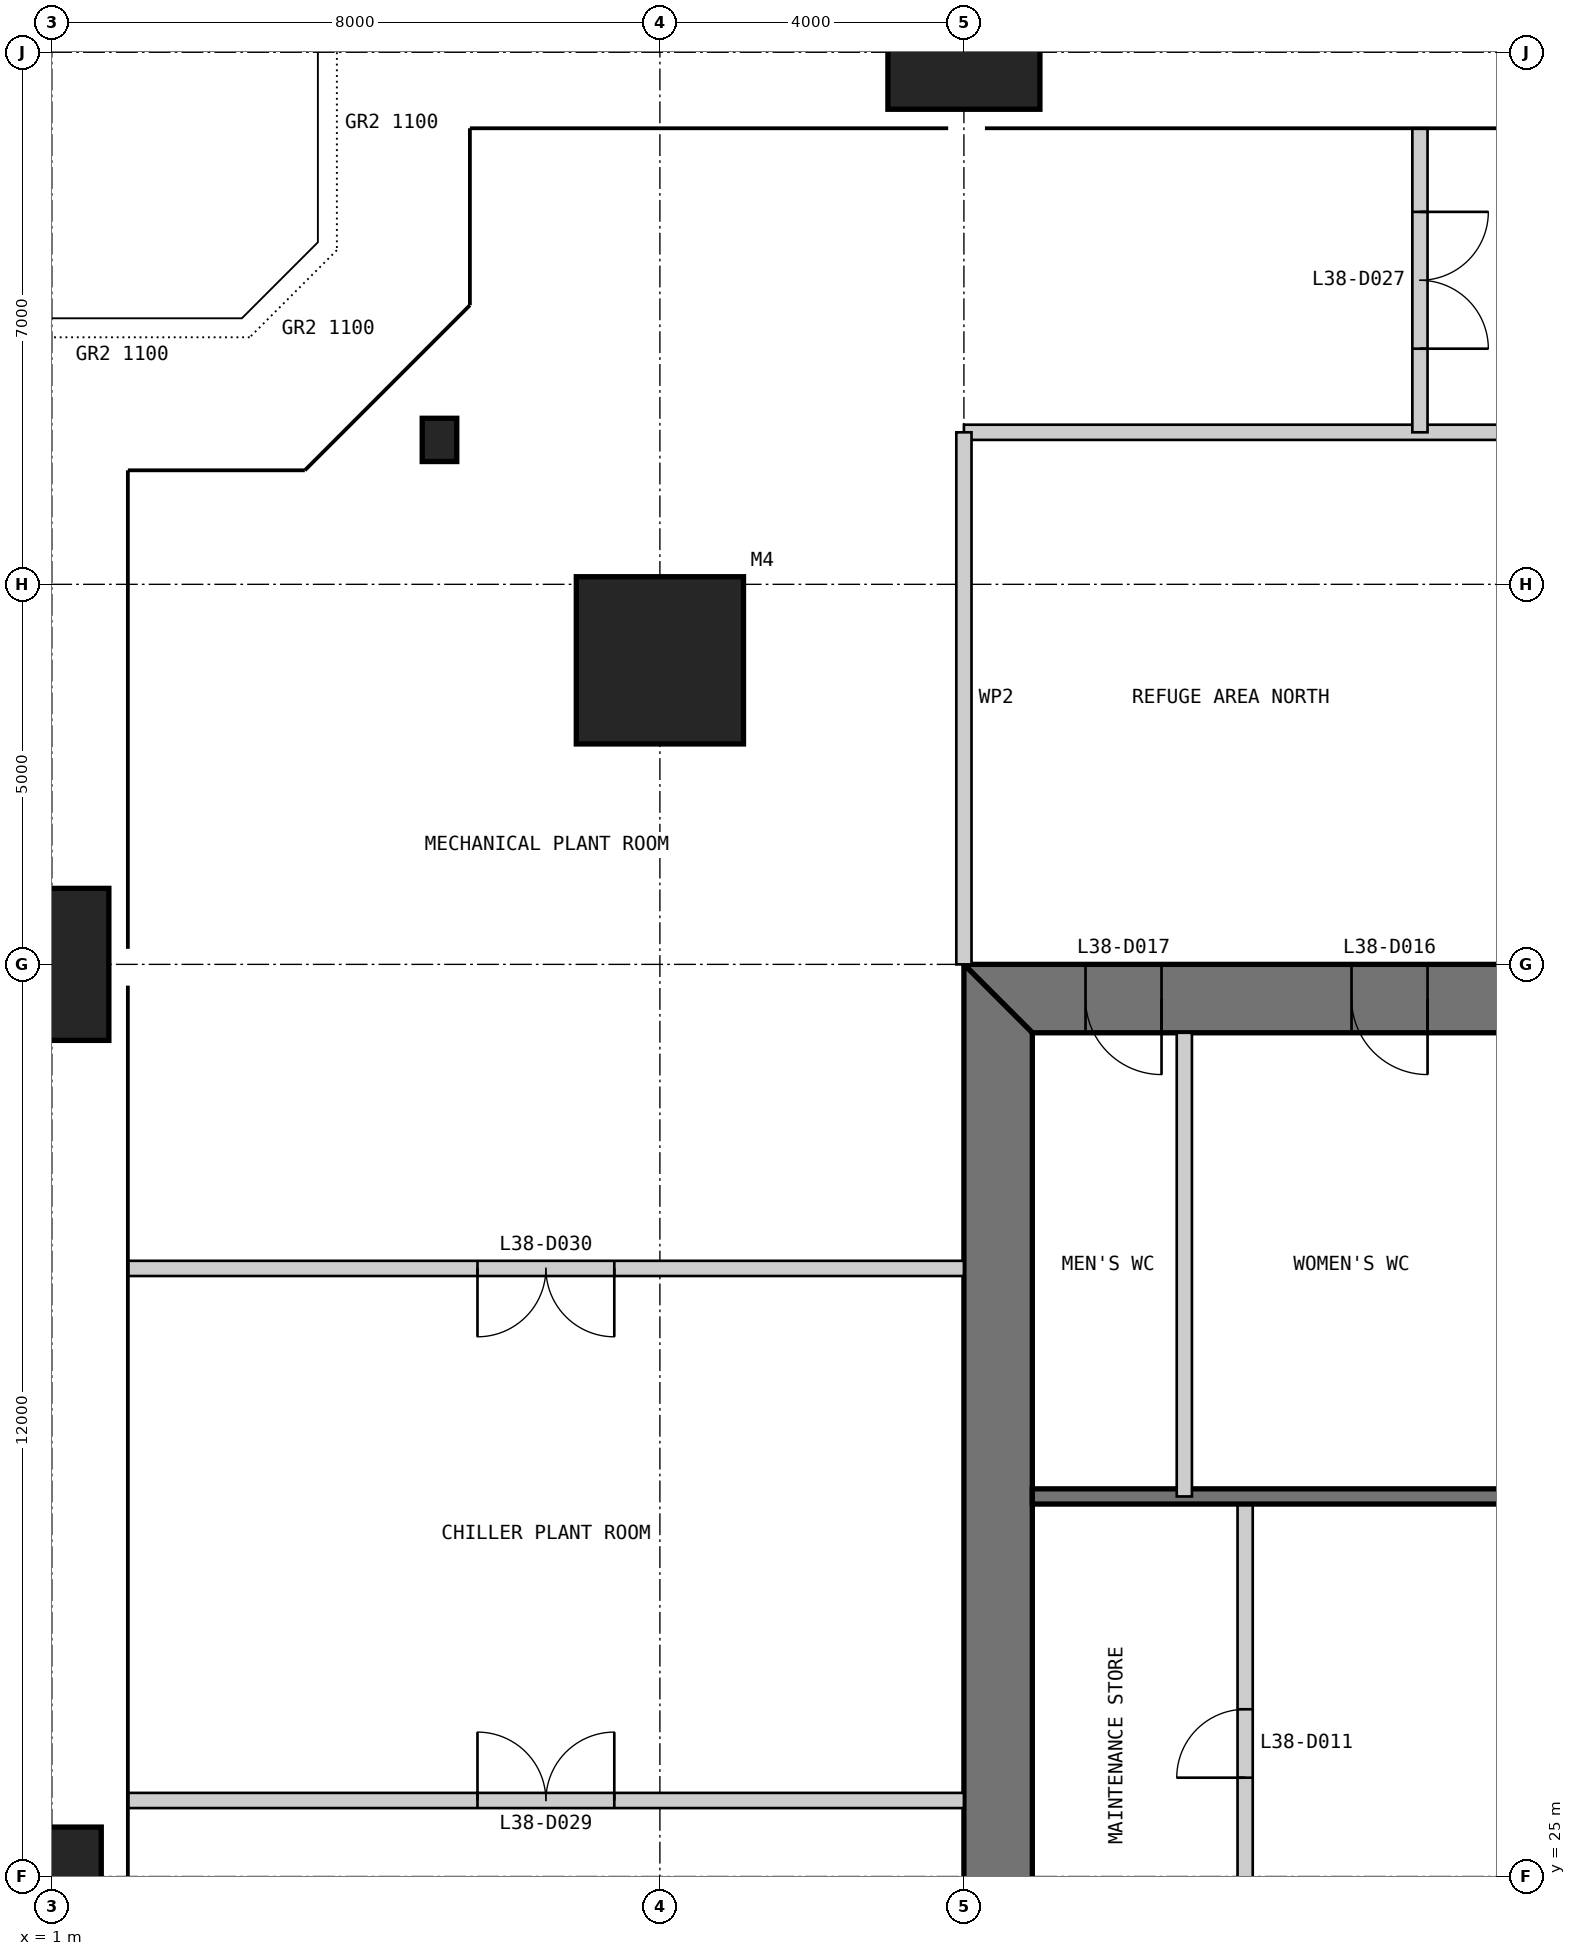
"""IFC4 building model, lengths in metres.
Left out: names, types, materials, properties, quantities, classifications, styles, units other than length and angle.
Written with IfcOpenShell. Run it as: python <this file> out.ifc"""

import sys

from ifc_helpers import new_model, si_unit, direction, frame, frame_2d, origin, origin_2d, place, context, subcontext, project, spatial, polyline, rectangle, i_section, outline, extrude, element, fill, save


model = new_model("IFC4")
c1 = context("Model", 3, precision=1e-05, world=origin(), true_north=direction((0.0, 1.0)))
c2 = subcontext(c1, "Body", "Model", "MODEL_VIEW")
j1 = project(units=[si_unit("LENGTHUNIT", "METRE"), si_unit("PLANEANGLEUNIT", "RADIAN")], contexts=[c1])
p1 = place(None, origin())
s1 = spatial("IfcSite", under=j1, at=p1, CompositionType="ELEMENT")
p2 = place(p1, origin())
s2 = spatial("IfcBuilding", under=s1, at=p2, CompositionType="ELEMENT")
p3 = place(p2, frame((0.0, 0.0, 162.4)))
s3 = spatial("IfcBuildingStorey", under=s2, at=p3, CompositionType="ELEMENT", Elevation=162.4)
p4 = place(p3, frame((9.0, 41.0, 0.0), z_axis=(0.0, 0.0, 1.0), x_axis=(1.0, 0.0, 0.0)))
e1 = element("IfcColumn", 1, at=p4, inside=s3, PredefinedType="COLUMN", context=c2, shape_type="SweptSolid", body=[
    extrude(rectangle(XDim=2.2, YDim=2.2, at=origin_2d()), origin(), (0.0, 0.0, 1.0), 6.0),
])
p5 = place(p3, frame((13.0, 49.0, 0.0), z_axis=(0.0, 0.0, 1.0), x_axis=(1.0, 0.0, 0.0)))
e2 = element("IfcColumn", 2, at=p5, inside=s3, PredefinedType="COLUMN", context=c2, shape_type="SweptSolid", body=[
    extrude(rectangle(XDim=2.0, YDim=1.5, at=origin_2d()), origin(), (0.0, 0.0, 1.0), 6.0),
])
p6 = place(p3, frame((1.0, 37.0, 0.0), z_axis=(0.0, 0.0, 1.0), x_axis=(1.0, 0.0, 0.0)))
e3 = element("IfcColumn", 3, at=p6, inside=s3, PredefinedType="COLUMN", context=c2, shape_type="SweptSolid", body=[
    extrude(rectangle(XDim=1.5, YDim=2.0, at=origin_2d()), origin(), (0.0, 0.0, 1.0), 6.0),
])
p7 = place(p3, frame((1.0, 25.0, 0.0), z_axis=(0.0, 0.0, 1.0), x_axis=(1.0, 0.0, 0.0)))
e4 = element("IfcColumn", 4, at=p7, inside=s3, PredefinedType="COLUMN", context=c2, shape_type="SweptSolid", body=[
    extrude(rectangle(XDim=1.3, YDim=1.3, at=origin_2d()), origin(), (0.0, 0.0, 1.0), 6.0),
])
p8 = place(p3, frame((6.1, 43.9, 0.0), z_axis=(0.0, 0.0, 1.0), x_axis=(1.0, 0.0, 0.0)))
e5 = element("IfcColumn", 5, at=p8, inside=s3, PredefinedType="COLUMN", context=c2, shape_type="SweptSolid", body=[
    extrude(i_section(OverallWidth=0.455, OverallDepth=0.569, WebThickness=0.078, FlangeThickness=0.125, at=origin_2d()), origin(), (0.0, 0.0, 1.0), 4.6),
])
p9 = place(p3, frame((37.0, 36.55, 0.0), z_axis=(0.0, 0.0, 1.0), x_axis=(-1.0, 0.0, 0.0)))
e6 = element("IfcWall", 6, at=p9, inside=s3, PredefinedType="SHEAR", context=c2, shape_type="SweptSolid", body=[
    extrude(outline(polyline([(0.0, -0.45), (24.0, -0.45), (23.1, 0.45), (0.9, 0.45), (0.0, -0.45)])), origin(), (0.0, 0.0, 1.0), 6.0),
])
p10 = place(p9, frame((4.9, 0.0, 0.0)))
e7 = element("IfcOpeningElement", 7, at=p10, cuts=e6, PredefinedType="OPENING", context=c2, shape_type="SweptSolid", body=[
    extrude(rectangle(XDim=1.0, YDim=2.2, at=frame_2d((0.5, 1.1))), frame((0.0, 0.46, 0.0), z_axis=(0.0, -1.0, 0.0), x_axis=(1.0, 0.0, 0.0)), (0.0, 0.0, 1.0), 0.92),
])
p11 = place(p9, frame((8.9, 0.0, 0.0)))
e8 = element("IfcOpeningElement", 8, at=p11, cuts=e6, PredefinedType="OPENING", context=c2, shape_type="SweptSolid", body=[
    extrude(rectangle(XDim=1.1, YDim=2.2, at=frame_2d((0.55, 1.1))), frame((0.0, 0.46, 0.0), z_axis=(0.0, -1.0, 0.0), x_axis=(1.0, 0.0, 0.0)), (0.0, 0.0, 1.0), 0.92),
])
p12 = place(p9, frame((15.05, 0.0, 0.0)))
e9 = element("IfcOpeningElement", 9, at=p12, cuts=e6, PredefinedType="OPENING", context=c2, shape_type="SweptSolid", body=[
    extrude(rectangle(XDim=0.9, YDim=2.2, at=frame_2d((0.45, 1.1))), frame((0.0, 0.46, 0.0), z_axis=(0.0, -1.0, 0.0), x_axis=(1.0, 0.0, 0.0)), (0.0, 0.0, 1.0), 0.92),
])
p13 = place(p9, frame((17.9, 0.0, 0.0)))
e10 = element("IfcOpeningElement", 10, at=p13, cuts=e6, PredefinedType="OPENING", context=c2, shape_type="SweptSolid", body=[
    extrude(rectangle(XDim=1.0, YDim=2.2, at=frame_2d((0.5, 1.1))), frame((0.0, 0.46, 0.0), z_axis=(0.0, -1.0, 0.0), x_axis=(1.0, 0.0, 0.0)), (0.0, 0.0, 1.0), 0.92),
])
p14 = place(p9, frame((21.4, 0.0, 0.0)))
e11 = element("IfcOpeningElement", 11, at=p14, cuts=e6, PredefinedType="OPENING", context=c2, shape_type="SweptSolid", body=[
    extrude(rectangle(XDim=1.0, YDim=2.2, at=frame_2d((0.5, 1.1))), frame((0.0, 0.46, 0.0), z_axis=(0.0, -1.0, 0.0), x_axis=(1.0, 0.0, 0.0)), (0.0, 0.0, 1.0), 0.92),
])
p15 = place(p3, frame((13.45, 36.1, 0.0), z_axis=(0.0, 0.0, 1.0), x_axis=(0.0, -1.0, 0.0)))
e12 = element("IfcWall", 12, at=p15, inside=s3, PredefinedType="SHEAR", context=c2, shape_type="SweptSolid", body=[
    extrude(outline(polyline([(-0.9, -0.45), (23.1, -0.45), (22.2, 0.45), (0.0, 0.45), (-0.9, -0.45)])), origin(), (0.0, 0.0, 1.0), 6.0),
])
p16 = place(p15, frame((20.2, 0.0, 0.0)))
e13 = element("IfcOpeningElement", 13, at=p16, cuts=e12, PredefinedType="OPENING", context=c2, shape_type="SweptSolid", body=[
    extrude(rectangle(XDim=1.0, YDim=2.2, at=frame_2d((0.5, 1.1))), frame((0.0, 0.46, 0.0), z_axis=(0.0, -1.0, 0.0), x_axis=(1.0, 0.0, 0.0)), (0.0, 0.0, 1.0), 0.92),
])
p17 = place(p15, frame((17.25, 0.0, 0.0)))
e14 = element("IfcOpeningElement", 14, at=p17, cuts=e12, PredefinedType="OPENING", context=c2, shape_type="SweptSolid", body=[
    extrude(rectangle(XDim=0.9, YDim=2.2, at=frame_2d((0.45, 1.1))), frame((0.0, 0.46, 0.0), z_axis=(0.0, -1.0, 0.0), x_axis=(1.0, 0.0, 0.0)), (0.0, 0.0, 1.0), 0.92),
])
p18 = place(p3, frame((16.7, 13.9, 0.0), z_axis=(0.0, 0.0, 1.0), x_axis=(0.0, 1.0, 0.0)))
e15 = element("IfcWall", 15, at=p18, inside=s3, PredefinedType="PARTITIONING", context=c2, shape_type="SweptSolid", body=[
    extrude(rectangle(XDim=16.1, YDim=0.2, at=frame_2d((8.05, 0.0))), origin(), (0.0, 0.0, 1.0), 5.8),
])
p19 = place(p18, frame((8.15, 0.0, 0.0)))
e16 = element("IfcOpeningElement", 16, at=p19, cuts=e15, PredefinedType="OPENING", context=c2, shape_type="SweptSolid", body=[
    extrude(rectangle(XDim=0.9, YDim=2.2, at=frame_2d((0.45, 1.1))), frame((0.0, 0.11, 0.0), z_axis=(0.0, -1.0, 0.0), x_axis=(1.0, 0.0, 0.0)), (0.0, 0.0, 1.0), 0.22),
])
p20 = place(p18, frame((12.4, 0.0, 0.0)))
e17 = element("IfcOpeningElement", 17, at=p20, cuts=e15, PredefinedType="OPENING", context=c2, shape_type="SweptSolid", body=[
    extrude(rectangle(XDim=0.9, YDim=2.2, at=frame_2d((0.45, 1.1))), frame((0.0, 0.11, 0.0), z_axis=(0.0, -1.0, 0.0), x_axis=(1.0, 0.0, 0.0)), (0.0, 0.0, 1.0), 0.22),
])
p21 = place(p3, frame((29.7, 30.0, 0.0), z_axis=(0.0, 0.0, 1.0), x_axis=(-1.0, 0.0, 0.0)))
e18 = element("IfcWall", 18, at=p21, inside=s3, PredefinedType="SOLIDWALL", context=c2, shape_type="SweptSolid", body=[
    extrude(rectangle(XDim=15.8, YDim=0.2, at=frame_2d((7.9, 0.0))), origin(), (0.0, 0.0, 1.0), 5.8),
])
p22 = place(p3, frame((15.9, 36.1, 0.0), z_axis=(0.0, 0.0, 1.0), x_axis=(0.0, -1.0, 0.0)))
e19 = element("IfcWall", 19, at=p22, inside=s3, PredefinedType="PARTITIONING", context=c2, shape_type="SweptSolid", body=[
    extrude(rectangle(XDim=6.1, YDim=0.2, at=frame_2d((3.05, 0.0))), origin(), (0.0, 0.0, 1.0), 5.8),
])
p23 = place(p3, frame((13.0, 44.0, 0.0), z_axis=(0.0, 0.0, 1.0), x_axis=(1.0, 0.0, 0.0)))
e20 = element("IfcWall", 20, at=p23, inside=s3, PredefinedType="PARTITIONING", context=c2, shape_type="SweptSolid", body=[
    extrude(rectangle(XDim=24.0, YDim=0.2, at=frame_2d((12.0, 0.0))), origin(), (0.0, 0.0, 1.0), 5.8),
])
p24 = place(p23, frame((8.0, 0.0, 0.0)))
e21 = element("IfcOpeningElement", 21, at=p24, cuts=e20, PredefinedType="OPENING", context=c2, shape_type="SweptSolid", body=[
    extrude(rectangle(XDim=1.0, YDim=2.2, at=frame_2d((0.5, 1.1))), frame((0.0, 0.11, 0.0), z_axis=(0.0, -1.0, 0.0), x_axis=(1.0, 0.0, 0.0)), (0.0, 0.0, 1.0), 0.22),
])
p25 = place(p3, frame((13.0, 37.0, 0.0), z_axis=(0.0, 0.0, 1.0), x_axis=(0.0, 1.0, 0.0)))
e22 = element("IfcWall", 22, at=p25, inside=s3, PredefinedType="PARTITIONING", context=c2, shape_type="SweptSolid", body=[
    extrude(rectangle(XDim=7.0, YDim=0.2, at=frame_2d((3.5, 0.0))), origin(), (0.0, 0.0, 1.0), 4.807),
])
p26 = place(p3, frame((19.0, 44.0, 0.0), z_axis=(0.0, 0.0, 1.0), x_axis=(0.0, 1.0, 0.0)))
e23 = element("IfcWall", 23, at=p26, inside=s3, PredefinedType="PARTITIONING", context=c2, shape_type="SweptSolid", body=[
    extrude(rectangle(XDim=4.0, YDim=0.2, at=frame_2d((2.0, 0.0))), origin(), (0.0, 0.0, 1.0), 4.954),
])
p27 = place(p26, frame((1.1, 0.0, 0.0)))
e24 = element("IfcOpeningElement", 24, at=p27, cuts=e23, PredefinedType="OPENING", context=c2, shape_type="SweptSolid", body=[
    extrude(rectangle(XDim=1.8, YDim=2.4, at=frame_2d((0.9, 1.2))), frame((0.0, 0.11, 0.0), z_axis=(0.0, -1.0, 0.0), x_axis=(1.0, 0.0, 0.0)), (0.0, 0.0, 1.0), 0.22),
])
p28 = place(p3, frame((2.0, 26.0, 0.0), z_axis=(0.0, 0.0, 1.0), x_axis=(1.0, 0.0, 0.0)))
e25 = element("IfcWall", 25, at=p28, inside=s3, PredefinedType="PARTITIONING", context=c2, shape_type="SweptSolid", body=[
    extrude(rectangle(XDim=11.0, YDim=0.2, at=frame_2d((5.5, 0.0))), origin(), (0.0, 0.0, 1.0), 5.8),
])
p29 = place(p28, frame((4.6, 0.0, 0.0)))
e26 = element("IfcOpeningElement", 26, at=p29, cuts=e25, PredefinedType="OPENING", context=c2, shape_type="SweptSolid", body=[
    extrude(rectangle(XDim=1.8, YDim=2.4, at=frame_2d((0.9, 1.2))), frame((0.0, 0.11, 0.0), z_axis=(0.0, -1.0, 0.0), x_axis=(1.0, 0.0, 0.0)), (0.0, 0.0, 1.0), 0.22),
])
p30 = place(p3, frame((2.0, 33.0, 0.0), z_axis=(0.0, 0.0, 1.0), x_axis=(1.0, 0.0, 0.0)))
e27 = element("IfcWall", 27, at=p30, inside=s3, PredefinedType="PARTITIONING", context=c2, shape_type="SweptSolid", body=[
    extrude(rectangle(XDim=11.0, YDim=0.2, at=frame_2d((5.5, 0.0))), origin(), (0.0, 0.0, 1.0), 5.8),
])
p31 = place(p30, frame((4.6, 0.0, 0.0)))
e28 = element("IfcOpeningElement", 28, at=p31, cuts=e27, PredefinedType="OPENING", context=c2, shape_type="SweptSolid", body=[
    extrude(rectangle(XDim=1.8, YDim=2.4, at=frame_2d((0.9, 1.2))), frame((0.0, 0.11, 0.0), z_axis=(0.0, -1.0, 0.0), x_axis=(1.0, 0.0, 0.0)), (0.0, 0.0, 1.0), 0.22),
])
p32 = place(p20, origin())
e29 = element("IfcDoor", 29, at=p32, inside=s3, OperationType="SINGLE_SWING_LEFT", PredefinedType="DOOR", context=c2, shape_type="SweptSolid", body=[
    extrude(rectangle(XDim=0.9, YDim=2.2, at=frame_2d((0.45, 1.1))), frame((0.0, 0.025, 0.0), z_axis=(0.0, -1.0, 0.0), x_axis=(1.0, 0.0, 0.0)), (0.0, 0.0, 1.0), 0.05),
])
fill(e17, e29)
p33 = place(p13, origin())
e30 = element("IfcDoor", 30, at=p33, inside=s3, OperationType="SINGLE_SWING_LEFT", PredefinedType="DOOR", context=c2, shape_type="SweptSolid", body=[
    extrude(rectangle(XDim=1.0, YDim=2.2, at=frame_2d((0.5, 1.1))), frame((0.0, 0.025, 0.0), z_axis=(0.0, -1.0, 0.0), x_axis=(1.0, 0.0, 0.0)), (0.0, 0.0, 1.0), 0.05),
    extrude(outline(polyline([(0.0, 0.0), (0.04, 0.0), (0.04, 2.16), (0.96, 2.16), (0.96, 0.0), (1.0, 0.0), (1.0, 2.2), (0.0, 2.2), (0.0, 0.0)])), frame((0.0, 0.3, 0.0), z_axis=(0.0, -1.0, 0.0), x_axis=(1.0, 0.0, 0.0)), (0.0, 0.0, 1.0), 0.6),
])
fill(e10, e30)
p34 = place(p14, origin())
e31 = element("IfcDoor", 31, at=p34, inside=s3, OperationType="SINGLE_SWING_LEFT", PredefinedType="DOOR", context=c2, shape_type="SweptSolid", body=[
    extrude(rectangle(XDim=1.0, YDim=2.2, at=frame_2d((0.5, 1.1))), frame((0.0, 0.025, 0.0), z_axis=(0.0, -1.0, 0.0), x_axis=(1.0, 0.0, 0.0)), (0.0, 0.0, 1.0), 0.05),
    extrude(outline(polyline([(0.0, 0.0), (0.04, 0.0), (0.04, 2.16), (0.96, 2.16), (0.96, 0.0), (1.0, 0.0), (1.0, 2.2), (0.0, 2.2), (0.0, 0.0)])), frame((0.0, 0.3, 0.0), z_axis=(0.0, -1.0, 0.0), x_axis=(1.0, 0.0, 0.0)), (0.0, 0.0, 1.0), 0.6),
])
fill(e11, e31)
p35 = place(p27, frame((1.8, 0.0, 0.0), z_axis=(0.0, 0.0, 1.0), x_axis=(-1.0, 0.0, 0.0)))
e32 = element("IfcDoor", 32, at=p35, inside=s3, OperationType="DOUBLE_DOOR_SINGLE_SWING", PredefinedType="DOOR", context=c2, shape_type="SweptSolid", body=[
    extrude(rectangle(XDim=1.8, YDim=2.4, at=frame_2d((0.9, 1.2))), frame((0.0, 0.025, 0.0), z_axis=(0.0, -1.0, 0.0), x_axis=(1.0, 0.0, 0.0)), (0.0, 0.0, 1.0), 0.05),
])
fill(e24, e32)
p36 = place(p29, origin())
e33 = element("IfcDoor", 33, at=p36, inside=s3, OperationType="DOUBLE_DOOR_SINGLE_SWING", PredefinedType="DOOR", context=c2, shape_type="SweptSolid", body=[
    extrude(rectangle(XDim=1.8, YDim=2.4, at=frame_2d((0.9, 1.2))), frame((0.0, 0.025, 0.0), z_axis=(0.0, -1.0, 0.0), x_axis=(1.0, 0.0, 0.0)), (0.0, 0.0, 1.0), 0.05),
])
fill(e26, e33)
p37 = place(p31, frame((1.8, 0.0, 0.0), z_axis=(0.0, 0.0, 1.0), x_axis=(-1.0, 0.0, 0.0)))
e34 = element("IfcDoor", 34, at=p37, inside=s3, OperationType="DOUBLE_DOOR_SINGLE_SWING", PredefinedType="DOOR", context=c2, shape_type="SweptSolid", body=[
    extrude(rectangle(XDim=1.8, YDim=2.4, at=frame_2d((0.9, 1.2))), frame((0.0, 0.025, 0.0), z_axis=(0.0, -1.0, 0.0), x_axis=(1.0, 0.0, 0.0)), (0.0, 0.0, 1.0), 0.05),
])
fill(e28, e34)
save(model, sys.argv[1])
